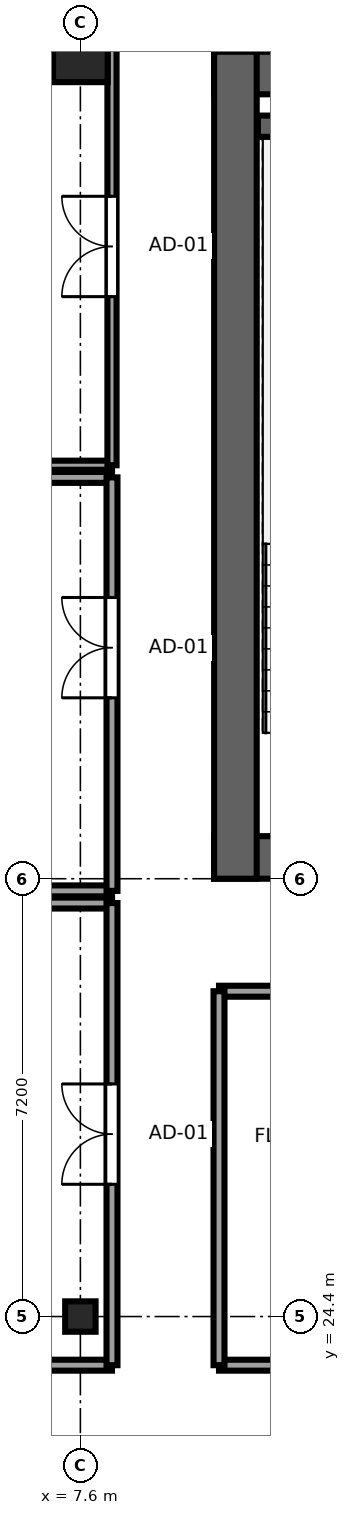
"""IFC4 building model, lengths in metres.
Left out: names, types, materials, properties, quantities, classifications, styles, units other than length and angle.
Written with IfcOpenShell. Run it as: python <this file> out.ifc"""

import sys

from ifc_helpers import new_model, si_unit, direction, frame, frame_2d, origin, origin_2d, place, context, subcontext, project, spatial, rectangle, i_section, extrude, source, transform, mapped, element, fill, save


model = new_model("IFC4")
c1 = context("Model", 3, precision=1e-05, world=origin(), true_north=direction((0.0, 1.0)))
c2 = subcontext(c1, "Body", "Model", "MODEL_VIEW")
j1 = project(units=[si_unit("LENGTHUNIT", "METRE"), si_unit("PLANEANGLEUNIT", "RADIAN")], contexts=[c1])
p1 = place(None, origin())
s1 = spatial("IfcSite", under=j1, at=p1, CompositionType="ELEMENT")
p2 = place(p1, origin())
s2 = spatial("IfcBuilding", under=s1, at=p2, CompositionType="ELEMENT")
p3 = place(p2, frame((0.0, 0.0, 125.75)))
s3 = spatial("IfcBuildingStorey", under=s2, at=p3, CompositionType="ELEMENT", Elevation=125.75)
p4 = place(p3, frame((9.8, 31.95, 0.0), z_axis=(0.0, 0.0, 1.0), x_axis=(1.0, 0.0, 0.0)))
e1 = element("IfcWall", 1, at=p4, inside=s3, PredefinedType="SHEAR", context=c2, shape_type="SweptSolid", body=[
    extrude(rectangle(XDim=26.4, YDim=0.7, at=frame_2d((13.2, 0.0))), origin(), (0.0, 0.0, 1.0), 3.55),
])
p5 = place(p4, frame((6.32, 0.0, 0.0), z_axis=(0.0, 0.0, 1.0), x_axis=(-1.0, 0.0, 0.0)))
e2 = element("IfcOpeningElement", 2, at=p5, cuts=e1, PredefinedType="OPENING", context=c2, shape_type="SweptSolid", body=[
    extrude(rectangle(XDim=1.5, YDim=2.04, at=frame_2d((0.75, 1.02))), frame((0.0, 0.36, 0.0), z_axis=(0.0, -1.0, 0.0), x_axis=(1.0, 0.0, 0.0)), (0.0, 0.0, 1.0), 0.72),
])
p6 = place(p4, frame((13.95, 0.0, 0.0), z_axis=(0.0, 0.0, 1.0), x_axis=(-1.0, 0.0, 0.0)))
e3 = element("IfcOpeningElement", 3, at=p6, cuts=e1, PredefinedType="OPENING", context=c2, shape_type="SweptSolid", body=[
    extrude(rectangle(XDim=1.5, YDim=2.04, at=frame_2d((0.75, 1.02))), frame((0.0, 0.36, 0.0), z_axis=(0.0, -1.0, 0.0), x_axis=(1.0, 0.0, 0.0)), (0.0, 0.0, 1.0), 0.72),
])
p7 = place(p4, frame((21.58, 0.0, 0.0), z_axis=(0.0, 0.0, 1.0), x_axis=(-1.0, 0.0, 0.0)))
e4 = element("IfcOpeningElement", 4, at=p7, cuts=e1, PredefinedType="OPENING", context=c2, shape_type="SweptSolid", body=[
    extrude(rectangle(XDim=1.5, YDim=2.04, at=frame_2d((0.75, 1.02))), frame((0.0, 0.36, 0.0), z_axis=(0.0, -1.0, 0.0), x_axis=(1.0, 0.0, 0.0)), (0.0, 0.0, 1.0), 0.72),
])
p8 = place(p4, frame((8.37, 0.0, 0.0), z_axis=(0.0, 0.0, 1.0), x_axis=(-1.0, 0.0, 0.0)))
e5 = element("IfcOpeningElement", 5, at=p8, cuts=e1, PredefinedType="OPENING", context=c2, shape_type="SweptSolid", body=[
    extrude(rectangle(XDim=0.82, YDim=2.01, at=frame_2d((0.41, 1.005))), frame((0.0, 0.36, 0.0), z_axis=(0.0, -1.0, 0.0), x_axis=(1.0, 0.0, 0.0)), (0.0, 0.0, 1.0), 0.72),
])
p9 = place(p4, frame((18.87, 0.0, 0.0), z_axis=(0.0, 0.0, 1.0), x_axis=(-1.0, 0.0, 0.0)))
e6 = element("IfcOpeningElement", 6, at=p9, cuts=e1, PredefinedType="OPENING", context=c2, shape_type="SweptSolid", body=[
    extrude(rectangle(XDim=0.82, YDim=2.01, at=frame_2d((0.41, 1.005))), frame((0.0, 0.36, 0.0), z_axis=(0.0, -1.0, 0.0), x_axis=(1.0, 0.0, 0.0)), (0.0, 0.0, 1.0), 0.72),
])
p10 = place(p3, frame((9.8, 44.85, 0.0), z_axis=(0.0, 0.0, 1.0), x_axis=(1.0, 0.0, 0.0)))
e7 = element("IfcWall", 7, at=p10, inside=s3, PredefinedType="SHEAR", context=c2, shape_type="SweptSolid", body=[
    extrude(rectangle(XDim=26.4, YDim=0.7, at=frame_2d((13.2, 0.0))), origin(), (0.0, 0.0, 1.0), 3.55),
])
p11 = place(p3, frame((10.15, 31.6, 0.0), z_axis=(0.0, 0.0, 1.0), x_axis=(0.0, 1.0, 0.0)))
e8 = element("IfcWall", 8, at=p11, inside=s3, PredefinedType="SHEAR", context=c2, shape_type="SweptSolid", body=[
    extrude(rectangle(XDim=13.6, YDim=0.7, at=frame_2d((6.8, 0.0))), origin(), (0.0, 0.0, 1.0), 3.55),
])
p12 = place(p3, frame((10.52, 43.975, 0.0), z_axis=(0.0, 0.0, 1.0), x_axis=(1.0, 0.0, 0.0)))
e9 = element("IfcWall", 9, at=p12, inside=s3, PredefinedType="SHEAR", context=c2, shape_type="SweptSolid", body=[
    extrude(rectangle(XDim=3.6, YDim=0.35, at=frame_2d((1.8, 0.0))), origin(), (0.0, 0.0, 1.0), 3.55),
])
m1 = source(origin(), c2, "Body", "SweptSolid", [
    extrude(i_section(OverallWidth=0.5, OverallDepth=0.5, WebThickness=0.022, FlangeThickness=0.034, at=origin_2d()), origin(), (0.0, 0.0, 1.0), 3.55),
])
p13 = place(p3, frame((7.6, 24.4, 0.0), z_axis=(0.0, 0.0, 1.0), x_axis=(1.0, 0.0, 0.0)))
e10 = element("IfcColumn", 10, at=p13, inside=s3, PredefinedType="COLUMN", context=c2, shape_type="MappedRepresentation", body=[
    mapped(m1, transform((0.0, 0.0, 0.0), x_axis=(1.0, 0.0, 0.0), y_axis=(0.0, 1.0, 0.0), z_axis=(0.0, 0.0, 1.0), scale=1.0)),
])
m2 = source(origin(), c2, "Body", "SweptSolid", [
    extrude(rectangle(XDim=0.9, YDim=0.9, at=origin_2d()), origin(), (0.0, 0.0, 1.0), 3.55),
])
p14 = place(p3, frame((7.6, 45.15, 0.0), z_axis=(0.0, 0.0, 1.0), x_axis=(1.0, 0.0, 0.0)))
e11 = element("IfcColumn", 11, at=p14, inside=s3, PredefinedType="COLUMN", context=c2, shape_type="MappedRepresentation", body=[
    mapped(m2, transform((0.0, 0.0, 0.0), x_axis=(1.0, 0.0, 0.0), y_axis=(0.0, 1.0, 0.0), z_axis=(0.0, 0.0, 1.0), scale=1.0)),
])
for number, where, z_axis, x_axis in (
    (12, (0.405, 23.6, 0.0), (0.0, 0.0, 1.0), (1.0, 0.0, 0.0)),
    (13, (0.405, 31.2, 0.0), (0.0, 0.0, 1.0), (1.0, 0.0, 0.0)),
):
    element("IfcWall", number, at=place(p3, frame(where, z_axis=z_axis, x_axis=x_axis)), inside=s3, PredefinedType="PARTITIONING", context=c2, shape_type="SweptSolid", body=[
        extrude(rectangle(XDim=7.715, YDim=0.18, at=frame_2d((3.857, 0.0))), origin(), (0.0, 0.0, 1.0), 3.37),
    ])
p15 = place(p3, frame((8.12, 23.6, 0.0), z_axis=(0.0, 0.0, 1.0), x_axis=(0.0, 1.0, 0.0)))
e14 = element("IfcWall", 14, at=p15, inside=s3, PredefinedType="PARTITIONING", context=c2, shape_type="SweptSolid", body=[
    extrude(rectangle(XDim=7.6, YDim=0.18, at=frame_2d((3.8, 0.0))), origin(), (0.0, 0.0, 1.0), 3.37),
])
p16 = place(p15, frame((2.975, 0.0, 0.0)))
e15 = element("IfcOpeningElement", 15, at=p16, cuts=e14, PredefinedType="OPENING", context=c2, shape_type="SweptSolid", body=[
    extrude(rectangle(XDim=1.65, YDim=2.15, at=frame_2d((0.825, 1.075))), frame((0.0, 0.1, 0.0), z_axis=(0.0, -1.0, 0.0), x_axis=(1.0, 0.0, 0.0)), (0.0, 0.0, 1.0), 0.2),
])
for number, where, z_axis, x_axis in (
    (16, (0.405, 31.4, 0.0), (0.0, 0.0, 1.0), (1.0, 0.0, 0.0)),
    (17, (0.405, 38.2, 0.0), (0.0, 0.0, 1.0), (1.0, 0.0, 0.0)),
):
    element("IfcWall", number, at=place(p3, frame(where, z_axis=z_axis, x_axis=x_axis)), inside=s3, PredefinedType="PARTITIONING", context=c2, shape_type="SweptSolid", body=[
        extrude(rectangle(XDim=7.715, YDim=0.18, at=frame_2d((3.857, 0.0))), origin(), (0.0, 0.0, 1.0), 3.37),
    ])
p17 = place(p3, frame((8.12, 31.4, 0.0), z_axis=(0.0, 0.0, 1.0), x_axis=(0.0, 1.0, 0.0)))
e18 = element("IfcWall", 18, at=p17, inside=s3, PredefinedType="PARTITIONING", context=c2, shape_type="SweptSolid", body=[
    extrude(rectangle(XDim=6.8, YDim=0.18, at=frame_2d((3.4, 0.0))), origin(), (0.0, 0.0, 1.0), 3.37),
])
p18 = place(p17, frame((3.175, 0.0, 0.0)))
e19 = element("IfcOpeningElement", 19, at=p18, cuts=e18, PredefinedType="OPENING", context=c2, shape_type="SweptSolid", body=[
    extrude(rectangle(XDim=1.65, YDim=2.15, at=frame_2d((0.825, 1.075))), frame((0.0, 0.1, 0.0), z_axis=(0.0, -1.0, 0.0), x_axis=(1.0, 0.0, 0.0)), (0.0, 0.0, 1.0), 0.2),
])
p19 = place(p3, frame((0.405, 38.4, 0.0), z_axis=(0.0, 0.0, 1.0), x_axis=(1.0, 0.0, 0.0)))
e20 = element("IfcWall", 20, at=p19, inside=s3, PredefinedType="PARTITIONING", context=c2, shape_type="SweptSolid", body=[
    extrude(rectangle(XDim=7.715, YDim=0.15, at=frame_2d((3.857, 0.0))), origin(), (0.0, 0.0, 1.0), 3.37),
])
p20 = place(p3, frame((8.12, 38.4, 0.0), z_axis=(0.0, 0.0, 1.0), x_axis=(0.0, 1.0, 0.0)))
e21 = element("IfcWall", 21, at=p20, inside=s3, PredefinedType="PARTITIONING", context=c2, shape_type="SweptSolid", body=[
    extrude(rectangle(XDim=7.195, YDim=0.15, at=frame_2d((3.598, 0.0))), origin(), (0.0, 0.0, 1.0), 3.37),
])
p21 = place(p20, frame((2.772, 0.0, 0.0)))
e22 = element("IfcOpeningElement", 22, at=p21, cuts=e21, PredefinedType="OPENING", context=c2, shape_type="SweptSolid", body=[
    extrude(rectangle(XDim=1.65, YDim=2.15, at=frame_2d((0.825, 1.075))), frame((0.0, 0.085, 0.0), z_axis=(0.0, -1.0, 0.0), x_axis=(1.0, 0.0, 0.0)), (0.0, 0.0, 1.0), 0.17),
])
p22 = place(p3, frame((9.88, 23.6, 0.0), z_axis=(0.0, 0.0, 1.0), x_axis=(1.0, 0.0, 0.0)))
e23 = element("IfcWall", 23, at=p22, inside=s3, PredefinedType="PARTITIONING", context=c2, shape_type="SweptSolid", body=[
    extrude(rectangle(XDim=4.22, YDim=0.18, at=frame_2d((2.11, 0.0))), origin(), (0.0, 0.0, 1.0), 3.37),
])
p23 = place(p22, frame((1.285, 0.0, 0.0)))
e24 = element("IfcOpeningElement", 24, at=p23, cuts=e23, PredefinedType="OPENING", context=c2, shape_type="SweptSolid", body=[
    extrude(rectangle(XDim=1.65, YDim=2.15, at=frame_2d((0.825, 1.075))), frame((0.0, 0.1, 0.0), z_axis=(0.0, -1.0, 0.0), x_axis=(1.0, 0.0, 0.0)), (0.0, 0.0, 1.0), 0.2),
])
p24 = place(p3, frame((9.88, 29.75, 0.0), z_axis=(0.0, 0.0, 1.0), x_axis=(1.0, 0.0, 0.0)))
e25 = element("IfcWall", 25, at=p24, inside=s3, PredefinedType="PARTITIONING", context=c2, shape_type="SweptSolid", body=[
    extrude(rectangle(XDim=4.22, YDim=0.18, at=frame_2d((2.11, 0.0))), origin(), (0.0, 0.0, 1.0), 3.37),
])
p25 = place(p3, frame((9.88, 23.6, 0.0), z_axis=(0.0, 0.0, 1.0), x_axis=(0.0, 1.0, 0.0)))
e26 = element("IfcWall", 26, at=p25, inside=s3, PredefinedType="PARTITIONING", context=c2, shape_type="SweptSolid", body=[
    extrude(rectangle(XDim=6.15, YDim=0.18, at=frame_2d((3.075, 0.0))), origin(), (0.0, 0.0, 1.0), 3.37),
])
m3 = source(origin(), c2, "Body", "SweptSolid", [
    extrude(rectangle(XDim=1.65, YDim=2.15, at=frame_2d((0.825, 1.075))), frame((0.0, 0.025, 0.0), z_axis=(0.0, -1.0, 0.0), x_axis=(1.0, 0.0, 0.0)), (0.0, 0.0, 1.0), 0.05),
])
p26 = place(p16, origin())
e27 = element("IfcDoor", 27, at=p26, inside=s3, OperationType="DOUBLE_DOOR_SINGLE_SWING", PredefinedType="DOOR", context=c2, shape_type="MappedRepresentation", body=[
    mapped(m3, transform((0.0, 0.0, 0.0), x_axis=(1.0, 0.0, 0.0), y_axis=(0.0, 1.0, 0.0), z_axis=(0.0, 0.0, 1.0), scale=1.0)),
])
fill(e15, e27)
p27 = place(p18, origin())
e28 = element("IfcDoor", 28, at=p27, inside=s3, OperationType="DOUBLE_DOOR_SINGLE_SWING", PredefinedType="DOOR", context=c2, shape_type="MappedRepresentation", body=[
    mapped(m3, transform((0.0, 0.0, 0.0), x_axis=(1.0, 0.0, 0.0), y_axis=(0.0, 1.0, 0.0), z_axis=(0.0, 0.0, 1.0), scale=1.0)),
])
fill(e19, e28)
p28 = place(p21, origin())
e29 = element("IfcDoor", 29, at=p28, inside=s3, OperationType="DOUBLE_DOOR_SINGLE_SWING", PredefinedType="DOOR", context=c2, shape_type="MappedRepresentation", body=[
    mapped(m3, transform((0.0, 0.0, 0.0), x_axis=(1.0, 0.0, 0.0), y_axis=(0.0, 1.0, 0.0), z_axis=(0.0, 0.0, 1.0), scale=1.0)),
])
fill(e22, e29)
save(model, sys.argv[1])
